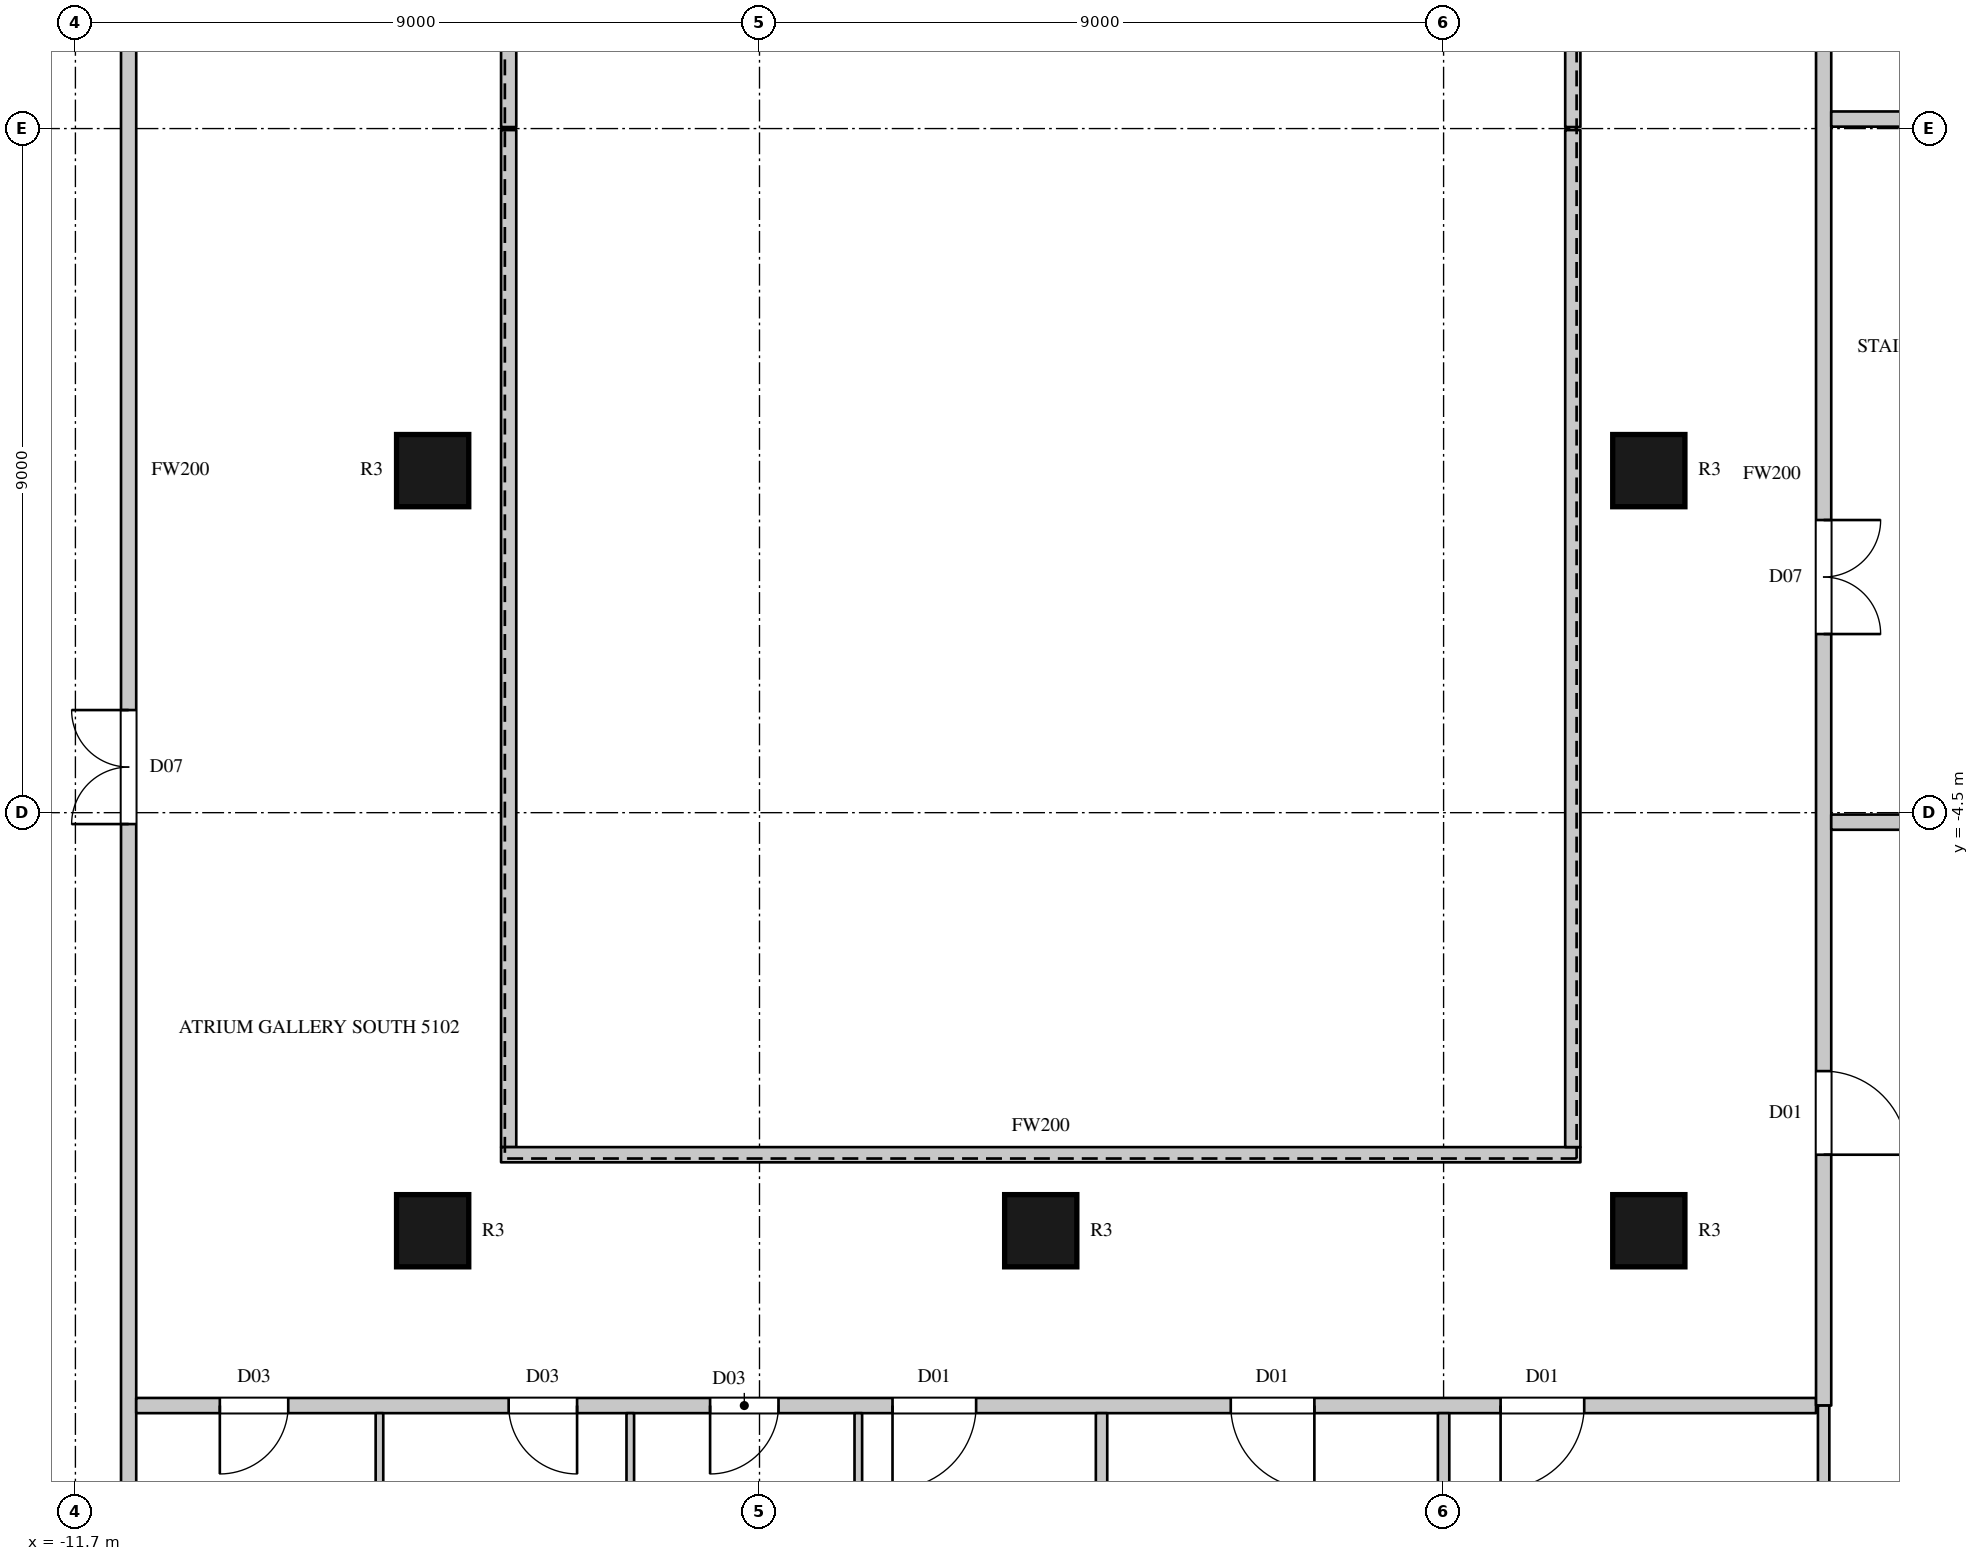
"""IFC4 building model, lengths in metres.
Left out: names, types, materials, properties, quantities, classifications, styles, units other than length and angle.
Written with IfcOpenShell. Run it as: python <this file> out.ifc"""

import sys

from ifc_helpers import new_model, si_unit, direction, frame, frame_2d, origin, origin_2d, place, context, subcontext, project, spatial, rectangle, circle, extrude, element, fill, save


model = new_model("IFC4")
c1 = context("Model", 3, precision=1e-05, world=origin(), true_north=direction((0.0, 1.0)))
c2 = subcontext(c1, "Body", "Model", "MODEL_VIEW")
j1 = project(units=[si_unit("LENGTHUNIT", "METRE"), si_unit("PLANEANGLEUNIT", "RADIAN")], contexts=[c1])
p1 = place(None, origin())
s1 = spatial("IfcSite", under=j1, at=p1, CompositionType="ELEMENT")
p2 = place(p1, origin())
s2 = spatial("IfcBuilding", under=s1, at=p2, CompositionType="ELEMENT")
p3 = place(p2, frame((0.0, 0.0, 230.2)))
s3 = spatial("IfcBuildingStorey", under=s2, at=p3, CompositionType="ELEMENT", Elevation=230.2)
for number, where, z_axis, x_axis in (
    (1, (-7.0, -10.0, 0.0), (0.0, 0.0, 1.0), (1.0, 0.0, 0.0)),
    (2, (-7.0, 0.0, 0.0), (0.0, 0.0, 1.0), (1.0, 0.0, 0.0)),
    (3, (1.0, -10.0, 0.0), (0.0, 0.0, 1.0), (1.0, 0.0, 0.0)),
    (4, (9.0, -10.0, 0.0), (0.0, 0.0, 1.0), (1.0, 0.0, 0.0)),
    (5, (9.0, 0.0, 0.0), (0.0, 0.0, 1.0), (1.0, 0.0, 0.0)),
):
    element("IfcColumn", number, at=place(p3, frame(where, z_axis=z_axis, x_axis=x_axis)), inside=s3, PredefinedType="COLUMN", context=c2, shape_type="SweptSolid", body=[
        extrude(circle(Radius=0.475, at=origin_2d()), origin(), (0.0, 0.0, 1.0), 4.1),
    ])
p4 = place(p3, frame((-11.0, -14.8, 0.0), z_axis=(0.0, 0.0, 1.0), x_axis=(0.0, 1.0, 0.0)))
e6 = element("IfcWall", 6, at=p4, inside=s3, PredefinedType="PARTITIONING", context=c2, shape_type="SweptSolid", body=[
    extrude(rectangle(XDim=29.6, YDim=0.2, at=frame_2d((14.8, 0.0))), origin(), (0.0, 0.0, 1.0), 3.8),
])
p5 = place(p4, frame((10.15, 0.0, 0.0)))
e7 = element("IfcOpeningElement", 7, at=p5, cuts=e6, PredefinedType="OPENING", context=c2, shape_type="SweptSolid", body=[
    extrude(rectangle(XDim=1.5, YDim=2.4, at=frame_2d((0.75, 1.2))), frame((0.0, 0.11, 0.0), z_axis=(0.0, -1.0, 0.0), x_axis=(1.0, 0.0, 0.0)), (0.0, 0.0, 1.0), 0.22),
])
p6 = place(p3, frame((-10.9, -12.3, 0.0), z_axis=(0.0, 0.0, 1.0), x_axis=(1.0, 0.0, 0.0)))
e8 = element("IfcWall", 8, at=p6, inside=s3, PredefinedType="PARTITIONING", context=c2, shape_type="SweptSolid", body=[
    extrude(rectangle(XDim=22.1, YDim=0.2, at=frame_2d((11.05, 0.0))), origin(), (0.0, 0.0, 1.0), 3.8),
])
p7 = place(p6, frame((1.1, 0.0, 0.0)))
e9 = element("IfcOpeningElement", 9, at=p7, cuts=e8, PredefinedType="OPENING", context=c2, shape_type="SweptSolid", body=[
    extrude(rectangle(XDim=0.9, YDim=2.2, at=frame_2d((0.45, 1.1))), frame((0.0, 0.11, 0.0), z_axis=(0.0, -1.0, 0.0), x_axis=(1.0, 0.0, 0.0)), (0.0, 0.0, 1.0), 0.22),
])
p8 = place(p6, frame((4.9, 0.0, 0.0)))
e10 = element("IfcOpeningElement", 10, at=p8, cuts=e8, PredefinedType="OPENING", context=c2, shape_type="SweptSolid", body=[
    extrude(rectangle(XDim=0.9, YDim=2.2, at=frame_2d((0.45, 1.1))), frame((0.0, 0.11, 0.0), z_axis=(0.0, -1.0, 0.0), x_axis=(1.0, 0.0, 0.0)), (0.0, 0.0, 1.0), 0.22),
])
p9 = place(p6, frame((7.55, 0.0, 0.0)))
e11 = element("IfcOpeningElement", 11, at=p9, cuts=e8, PredefinedType="OPENING", context=c2, shape_type="SweptSolid", body=[
    extrude(rectangle(XDim=0.9, YDim=2.2, at=frame_2d((0.45, 1.1))), frame((0.0, 0.11, 0.0), z_axis=(0.0, -1.0, 0.0), x_axis=(1.0, 0.0, 0.0)), (0.0, 0.0, 1.0), 0.22),
])
p10 = place(p6, frame((9.95, 0.0, 0.0)))
e12 = element("IfcOpeningElement", 12, at=p10, cuts=e8, PredefinedType="OPENING", context=c2, shape_type="SweptSolid", body=[
    extrude(rectangle(XDim=1.1, YDim=2.4, at=frame_2d((0.55, 1.2))), frame((0.0, 0.11, 0.0), z_axis=(0.0, -1.0, 0.0), x_axis=(1.0, 0.0, 0.0)), (0.0, 0.0, 1.0), 0.22),
])
p11 = place(p6, frame((14.4, 0.0, 0.0)))
e13 = element("IfcOpeningElement", 13, at=p11, cuts=e8, PredefinedType="OPENING", context=c2, shape_type="SweptSolid", body=[
    extrude(rectangle(XDim=1.1, YDim=2.4, at=frame_2d((0.55, 1.2))), frame((0.0, 0.11, 0.0), z_axis=(0.0, -1.0, 0.0), x_axis=(1.0, 0.0, 0.0)), (0.0, 0.0, 1.0), 0.22),
])
p12 = place(p6, frame((17.95, 0.0, 0.0)))
e14 = element("IfcOpeningElement", 14, at=p12, cuts=e8, PredefinedType="OPENING", context=c2, shape_type="SweptSolid", body=[
    extrude(rectangle(XDim=1.1, YDim=2.4, at=frame_2d((0.55, 1.2))), frame((0.0, 0.11, 0.0), z_axis=(0.0, -1.0, 0.0), x_axis=(1.0, 0.0, 0.0)), (0.0, 0.0, 1.0), 0.22),
])
p13 = place(p3, frame((-6.0, -8.9, 0.0), z_axis=(0.0, 0.0, 1.0), x_axis=(0.0, 1.0, 0.0)))
e15 = element("IfcWall", 15, at=p13, inside=s3, PredefinedType="PARTITIONING", context=c2, shape_type="SweptSolid", body=[
    extrude(rectangle(XDim=13.38, YDim=0.2, at=frame_2d((6.69, 0.0))), origin(), (0.0, 0.0, 1.0), 3.8),
])
p14 = place(p3, frame((-6.1, -9.0, 0.0), z_axis=(0.0, 0.0, 1.0), x_axis=(1.0, 0.0, 0.0)))
e16 = element("IfcWall", 16, at=p14, inside=s3, PredefinedType="PARTITIONING", context=c2, shape_type="SweptSolid", body=[
    extrude(rectangle(XDim=14.2, YDim=0.2, at=frame_2d((7.1, 0.0))), origin(), (0.0, 0.0, 1.0), 3.8),
])
p15 = place(p3, frame((-6.0, 4.52, 0.0), z_axis=(0.0, 0.0, 1.0), x_axis=(0.0, 1.0, 0.0)))
e17 = element("IfcWall", 17, at=p15, inside=s3, PredefinedType="PARTITIONING", context=c2, shape_type="SweptSolid", body=[
    extrude(rectangle(XDim=4.38, YDim=0.2, at=frame_2d((2.19, 0.0))), origin(), (0.0, 0.0, 1.0), 3.8),
])
p16 = place(p3, frame((8.0, -8.9, 0.0), z_axis=(0.0, 0.0, 1.0), x_axis=(0.0, 1.0, 0.0)))
e18 = element("IfcWall", 18, at=p16, inside=s3, PredefinedType="PARTITIONING", context=c2, shape_type="SweptSolid", body=[
    extrude(rectangle(XDim=13.38, YDim=0.2, at=frame_2d((6.69, 0.0))), origin(), (0.0, 0.0, 1.0), 3.8),
])
p17 = place(p3, frame((8.0, 4.52, 0.0), z_axis=(0.0, 0.0, 1.0), x_axis=(0.0, 1.0, 0.0)))
e19 = element("IfcWall", 19, at=p17, inside=s3, PredefinedType="PARTITIONING", context=c2, shape_type="SweptSolid", body=[
    extrude(rectangle(XDim=4.38, YDim=0.2, at=frame_2d((2.19, 0.0))), origin(), (0.0, 0.0, 1.0), 3.8),
])
p18 = place(p3, frame((11.3, -12.3, 0.0), z_axis=(0.0, 0.0, 1.0), x_axis=(0.0, 1.0, 0.0)))
e20 = element("IfcWall", 20, at=p18, inside=s3, PredefinedType="PARTITIONING", context=c2, shape_type="SweptSolid", body=[
    extrude(rectangle(XDim=24.5, YDim=0.2, at=frame_2d((12.25, 0.0))), origin(), (0.0, 0.0, 1.0), 3.8),
])
p19 = place(p18, frame((10.15, 0.0, 0.0)))
e21 = element("IfcOpeningElement", 21, at=p19, cuts=e20, PredefinedType="OPENING", context=c2, shape_type="SweptSolid", body=[
    extrude(rectangle(XDim=1.5, YDim=2.4, at=frame_2d((0.75, 1.2))), frame((0.0, 0.11, 0.0), z_axis=(0.0, -1.0, 0.0), x_axis=(1.0, 0.0, 0.0)), (0.0, 0.0, 1.0), 0.22),
])
p20 = place(p18, frame((3.3, 0.0, 0.0)))
e22 = element("IfcOpeningElement", 22, at=p20, cuts=e20, PredefinedType="OPENING", context=c2, shape_type="SweptSolid", body=[
    extrude(rectangle(XDim=1.1, YDim=2.4, at=frame_2d((0.55, 1.2))), frame((0.0, 0.11, 0.0), z_axis=(0.0, -1.0, 0.0), x_axis=(1.0, 0.0, 0.0)), (0.0, 0.0, 1.0), 0.22),
])
for number, where, z_axis, x_axis in (
    (23, (11.4, -4.625, 0.0), (0.0, 0.0, 1.0), (1.0, 0.0, 0.0)),
    (24, (11.4, 4.625, 0.0), (0.0, 0.0, 1.0), (1.0, 0.0, 0.0)),
):
    element("IfcWall", number, at=place(p3, frame(where, z_axis=z_axis, x_axis=x_axis)), inside=s3, PredefinedType="PARTITIONING", context=c2, shape_type="SweptSolid", body=[
        extrude(rectangle(XDim=3.275, YDim=0.2, at=frame_2d((1.638, 0.0))), origin(), (0.0, 0.0, 1.0), 3.8),
    ])
p21 = place(p3, frame((1.8, -16.7, 0.0), z_axis=(0.0, 0.0, 1.0), x_axis=(0.0, 1.0, 0.0)))
e25 = element("IfcWall", 25, at=p21, inside=s3, PredefinedType="PARTITIONING", context=c2, shape_type="SweptSolid", body=[
    extrude(rectangle(XDim=4.3, YDim=0.15, at=frame_2d((2.15, 0.0))), origin(), (0.0, 0.0, 1.0), 3.15),
])
p22 = place(p3, frame((6.3, -16.05, 0.0), z_axis=(0.0, 0.0, 1.0), x_axis=(0.0, 1.0, 0.0)))
e26 = element("IfcWall", 26, at=p22, inside=s3, PredefinedType="PARTITIONING", context=c2, shape_type="SweptSolid", body=[
    extrude(rectangle(XDim=3.65, YDim=0.15, at=frame_2d((1.825, 0.0))), origin(), (0.0, 0.0, 1.0), 3.25),
])
p23 = place(p3, frame((11.3, -16.7, 0.0), z_axis=(0.0, 0.0, 1.0), x_axis=(0.0, 1.0, 0.0)))
e27 = element("IfcWall", 27, at=p23, inside=s3, PredefinedType="PARTITIONING", context=c2, shape_type="SweptSolid", body=[
    extrude(rectangle(XDim=4.4, YDim=0.15, at=frame_2d((2.2, 0.0))), origin(), (0.0, 0.0, 1.0), 3.8),
])
for number, where, z_axis, x_axis in (
    (28, (-7.7, -16.7, 0.0), (0.0, 0.0, 1.0), (0.0, 1.0, 0.0)),
    (29, (-4.4, -16.7, 0.0), (0.0, 0.0, 1.0), (0.0, 1.0, 0.0)),
    (30, (-1.4, -16.7, 0.0), (0.0, 0.0, 1.0), (0.0, 1.0, 0.0)),
):
    element("IfcWall", number, at=place(p3, frame(where, z_axis=z_axis, x_axis=x_axis)), inside=s3, PredefinedType="PARTITIONING", context=c2, shape_type="SweptSolid", body=[
        extrude(rectangle(XDim=4.3, YDim=0.1, at=frame_2d((2.15, 0.0))), origin(), (0.0, 0.0, 1.0), 3.8),
    ])
p24 = place(p5, origin())
e31 = element("IfcDoor", 31, at=p24, inside=s3, OperationType="DOUBLE_DOOR_SINGLE_SWING", PredefinedType="DOOR", context=c2, shape_type="SweptSolid", body=[
    extrude(rectangle(XDim=1.5, YDim=2.4, at=frame_2d((0.75, 1.2))), frame((0.0, 0.025, 0.0), z_axis=(0.0, -1.0, 0.0), x_axis=(1.0, 0.0, 0.0)), (0.0, 0.0, 1.0), 0.05),
])
fill(e7, e31)
p25 = place(p19, origin())
e32 = element("IfcDoor", 32, at=p25, inside=s3, OperationType="DOUBLE_DOOR_SINGLE_SWING", PredefinedType="DOOR", context=c2, shape_type="SweptSolid", body=[
    extrude(rectangle(XDim=1.5, YDim=2.4, at=frame_2d((0.75, 1.2))), frame((0.0, 0.025, 0.0), z_axis=(0.0, -1.0, 0.0), x_axis=(1.0, 0.0, 0.0)), (0.0, 0.0, 1.0), 0.05),
])
fill(e21, e32)
p26 = place(p7, origin())
e33 = element("IfcDoor", 33, at=p26, inside=s3, OperationType="SINGLE_SWING_RIGHT", PredefinedType="DOOR", context=c2, shape_type="SweptSolid", body=[
    extrude(rectangle(XDim=0.9, YDim=2.2, at=frame_2d((0.45, 1.1))), frame((0.0, 0.025, 0.0), z_axis=(0.0, -1.0, 0.0), x_axis=(1.0, 0.0, 0.0)), (0.0, 0.0, 1.0), 0.05),
])
fill(e9, e33)
p27 = place(p8, origin())
e34 = element("IfcDoor", 34, at=p27, inside=s3, OperationType="SINGLE_SWING_LEFT", PredefinedType="DOOR", context=c2, shape_type="SweptSolid", body=[
    extrude(rectangle(XDim=0.9, YDim=2.2, at=frame_2d((0.45, 1.1))), frame((0.0, 0.025, 0.0), z_axis=(0.0, -1.0, 0.0), x_axis=(1.0, 0.0, 0.0)), (0.0, 0.0, 1.0), 0.05),
])
fill(e10, e34)
p28 = place(p9, origin())
e35 = element("IfcDoor", 35, at=p28, inside=s3, OperationType="SINGLE_SWING_RIGHT", PredefinedType="DOOR", context=c2, shape_type="SweptSolid", body=[
    extrude(rectangle(XDim=0.9, YDim=2.2, at=frame_2d((0.45, 1.1))), frame((0.0, 0.025, 0.0), z_axis=(0.0, -1.0, 0.0), x_axis=(1.0, 0.0, 0.0)), (0.0, 0.0, 1.0), 0.05),
])
fill(e11, e35)
p29 = place(p10, origin())
e36 = element("IfcDoor", 36, at=p29, inside=s3, OperationType="SINGLE_SWING_RIGHT", PredefinedType="DOOR", context=c2, shape_type="SweptSolid", body=[
    extrude(rectangle(XDim=1.1, YDim=2.4, at=frame_2d((0.55, 1.2))), frame((0.0, 0.025, 0.0), z_axis=(0.0, -1.0, 0.0), x_axis=(1.0, 0.0, 0.0)), (0.0, 0.0, 1.0), 0.05),
])
fill(e12, e36)
p30 = place(p11, origin())
e37 = element("IfcDoor", 37, at=p30, inside=s3, OperationType="SINGLE_SWING_LEFT", PredefinedType="DOOR", context=c2, shape_type="SweptSolid", body=[
    extrude(rectangle(XDim=1.1, YDim=2.4, at=frame_2d((0.55, 1.2))), frame((0.0, 0.025, 0.0), z_axis=(0.0, -1.0, 0.0), x_axis=(1.0, 0.0, 0.0)), (0.0, 0.0, 1.0), 0.05),
])
fill(e13, e37)
p31 = place(p12, origin())
e38 = element("IfcDoor", 38, at=p31, inside=s3, OperationType="SINGLE_SWING_RIGHT", PredefinedType="DOOR", context=c2, shape_type="SweptSolid", body=[
    extrude(rectangle(XDim=1.1, YDim=2.4, at=frame_2d((0.55, 1.2))), frame((0.0, 0.025, 0.0), z_axis=(0.0, -1.0, 0.0), x_axis=(1.0, 0.0, 0.0)), (0.0, 0.0, 1.0), 0.05),
])
fill(e14, e38)
p32 = place(p20, origin())
e39 = element("IfcDoor", 39, at=p32, inside=s3, OperationType="SINGLE_SWING_RIGHT", PredefinedType="DOOR", context=c2, shape_type="SweptSolid", body=[
    extrude(rectangle(XDim=1.1, YDim=2.4, at=frame_2d((0.55, 1.2))), frame((0.0, 0.025, 0.0), z_axis=(0.0, -1.0, 0.0), x_axis=(1.0, 0.0, 0.0)), (0.0, 0.0, 1.0), 0.05),
])
fill(e22, e39)
save(model, sys.argv[1])
